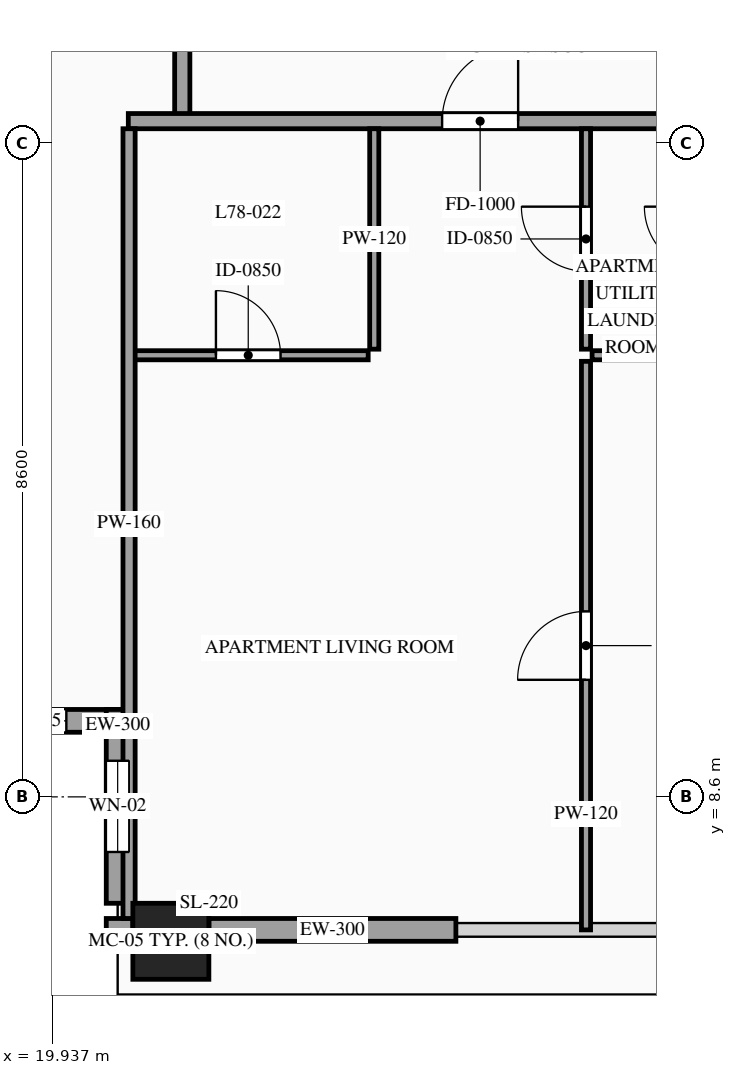
"""IFC4 building model, lengths in metres.
Left out: names, types, materials, properties, quantities, classifications, styles, units other than length and angle.
Written with IfcOpenShell. Run it as: python <this file> out.ifc"""

import sys

from ifc_helpers import new_model, si_unit, direction, frame, frame_2d, origin, origin_2d, place, context, subcontext, project, spatial, rectangle, hollow_rectangle, extrude, source, transform, mapped, element, fill, save


model = new_model("IFC4")
c1 = context("Model", 3, precision=1e-05, world=origin(), true_north=direction((0.0, 1.0)))
c2 = subcontext(c1, "Body", "Model", "MODEL_VIEW")
j1 = project(units=[si_unit("LENGTHUNIT", "METRE"), si_unit("PLANEANGLEUNIT", "RADIAN")], contexts=[c1])
p1 = place(None, origin())
s1 = spatial("IfcSite", under=j1, at=p1, CompositionType="ELEMENT")
p2 = place(p1, origin())
s2 = spatial("IfcBuilding", under=s1, at=p2, CompositionType="ELEMENT")
p3 = place(p2, frame((0.0, 0.0, 292.6)))
s3 = spatial("IfcBuildingStorey", under=s2, at=p3, CompositionType="ELEMENT", Elevation=292.6)
m1 = source(origin(), c2, "Body", "SweptSolid", [
    extrude(hollow_rectangle(XDim=1.0, YDim=1.0, WallThickness=0.048, at=origin_2d()), origin(), (0.0, 0.0, 1.0), 3.5),
])
p4 = place(p3, frame((21.5, 6.7, 0.0), z_axis=(0.0, 0.0, 1.0), x_axis=(1.0, 0.0, 0.0)))
e1 = element("IfcColumn", 1, at=p4, inside=s3, PredefinedType="COLUMN", context=c2, shape_type="MappedRepresentation", body=[
    mapped(m1, transform((0.0, 0.0, 0.0), scale=1.0)),
])
p5 = place(p3, frame((18.4, 9.6, 0.0), z_axis=(0.0, 0.0, 1.0), x_axis=(1.0, 0.0, 0.0)))
e2 = element("IfcWall", 2, at=p5, inside=s3, PredefinedType="SOLIDWALL", context=c2, shape_type="SweptSolid", body=[
    extrude(rectangle(XDim=2.55, YDim=0.3, at=frame_2d((1.275, 0.0))), origin(), (0.0, 0.0, 1.0), 3.28),
])
p6 = place(p5, frame((0.825, 0.0, 0.85)))
e3 = element("IfcOpeningElement", 3, at=p6, cuts=e2, PredefinedType="OPENING", context=c2, shape_type="SweptSolid", body=[
    extrude(rectangle(XDim=0.9, YDim=1.5, at=frame_2d((0.45, 0.75))), frame((0.0, 0.165, 0.0), z_axis=(0.0, -1.0, 0.0), x_axis=(1.0, 0.0, 0.0)), (0.0, 0.0, 1.0), 0.33),
])
p7 = place(p3, frame((20.8, 9.75, 0.0), z_axis=(0.0, 0.0, 1.0), x_axis=(0.0, -1.0, 0.0)))
e4 = element("IfcWall", 4, at=p7, inside=s3, PredefinedType="SOLIDWALL", context=c2, shape_type="SweptSolid", body=[
    extrude(rectangle(XDim=2.55, YDim=0.3, at=frame_2d((1.275, 0.0))), origin(), (0.0, 0.0, 1.0), 3.28),
])
p8 = place(p7, frame((0.675, 0.0, 0.85)))
e5 = element("IfcOpeningElement", 5, at=p8, cuts=e4, PredefinedType="OPENING", context=c2, shape_type="SweptSolid", body=[
    extrude(rectangle(XDim=1.2, YDim=2.1, at=frame_2d((0.6, 1.05))), frame((0.0, 0.165, 0.0), z_axis=(0.0, -1.0, 0.0), x_axis=(1.0, 0.0, 0.0)), (0.0, 0.0, 1.0), 0.33),
])
m2 = source(origin(), c2, "Body", "SweptSolid", [
    extrude(rectangle(XDim=0.35, YDim=0.3, at=frame_2d((0.175, 0.0))), origin(), (0.0, 0.0, 1.0), 3.28),
])
p9 = place(p3, frame((20.65, 6.85, 0.0), z_axis=(0.0, 0.0, 1.0), x_axis=(1.0, 0.0, 0.0)))
e6 = element("IfcWall", 6, at=p9, inside=s3, PredefinedType="SOLIDWALL", context=c2, shape_type="MappedRepresentation", body=[
    mapped(m2, transform((0.0, 0.0, 0.0), scale=1.0)),
])
m3 = source(origin(), c2, "Body", "SweptSolid", [
    extrude(rectangle(XDim=3.25, YDim=0.3, at=frame_2d((1.625, 0.0))), origin(), (0.0, 0.0, 1.0), 2.885),
])
p10 = place(p3, frame((22.0, 6.85, 0.0), z_axis=(0.0, 0.0, 1.0), x_axis=(1.0, 0.0, 0.0)))
e7 = element("IfcWall", 7, at=p10, inside=s3, PredefinedType="SOLIDWALL", context=c2, shape_type="MappedRepresentation", body=[
    mapped(m3, transform((0.0, 0.0, 0.0), scale=1.0)),
])
m4 = source(origin(), c2, "Body", "SweptSolid", [
    extrude(rectangle(XDim=1.7, YDim=0.2, at=frame_2d((0.85, 0.0))), origin(), (0.0, 0.0, 1.0), 3.28),
])
p11 = place(p3, frame((21.65, 17.55, 0.0), z_axis=(0.0, 0.0, 1.0), x_axis=(0.0, 1.0, 0.0)))
e8 = element("IfcWall", 8, at=p11, inside=s3, PredefinedType="PARTITIONING", context=c2, shape_type="MappedRepresentation", body=[
    mapped(m4, transform((0.0, 0.0, 0.0), scale=1.0)),
])
p12 = place(p3, frame((20.94, 17.49, 0.0), z_axis=(0.0, 0.0, 1.0), x_axis=(1.0, 0.0, 0.0)))
e9 = element("IfcWall", 9, at=p12, inside=s3, PredefinedType="PARTITIONING", context=c2, shape_type="SweptSolid", body=[
    extrude(rectangle(XDim=10.52, YDim=0.2, at=frame_2d((5.26, 0.0))), origin(), (0.0, 0.0, 1.0), 3.28),
])
p13 = place(p12, frame((4.129, 0.0, 0.0)))
e10 = element("IfcOpeningElement", 10, at=p13, cuts=e9, PredefinedType="OPENING", context=c2, shape_type="SweptSolid", body=[
    extrude(rectangle(XDim=1.0, YDim=2.2, at=frame_2d((0.5, 1.1))), frame((0.0, 0.115, 0.0), z_axis=(0.0, -1.0, 0.0), x_axis=(1.0, 0.0, 0.0)), (0.0, 0.0, 1.0), 0.23),
])
p14 = place(p3, frame((20.94, 14.41, 0.0), z_axis=(0.0, 0.0, 1.0), x_axis=(1.0, 0.0, 0.0)))
e11 = element("IfcWall", 11, at=p14, inside=s3, PredefinedType="PARTITIONING", context=c2, shape_type="SweptSolid", body=[
    extrude(rectangle(XDim=3.156, YDim=0.12, at=frame_2d((1.578, 0.0))), origin(), (0.0, 0.0, 1.0), 3.28),
])
p15 = place(p14, frame((1.153, 0.0, 0.0)))
e12 = element("IfcOpeningElement", 12, at=p15, cuts=e11, PredefinedType="OPENING", context=c2, shape_type="SweptSolid", body=[
    extrude(rectangle(XDim=0.85, YDim=2.1, at=frame_2d((0.425, 1.05))), frame((0.0, 0.075, 0.0), z_axis=(0.0, -1.0, 0.0), x_axis=(1.0, 0.0, 0.0)), (0.0, 0.0, 1.0), 0.15),
])
m5 = source(origin(), c2, "Body", "SweptSolid", [
    extrude(rectangle(XDim=2.9, YDim=0.12, at=frame_2d((1.45, 0.0))), origin(), (0.0, 0.0, 1.0), 3.28),
])
p16 = place(p3, frame((24.176, 14.49, 0.0), z_axis=(0.0, 0.0, 1.0), x_axis=(0.0, 1.0, 0.0)))
e13 = element("IfcWall", 13, at=p16, inside=s3, PredefinedType="PARTITIONING", context=c2, shape_type="MappedRepresentation", body=[
    mapped(m5, transform((0.0, 0.0, 0.0), scale=1.0)),
])
m6 = source(origin(), c2, "Body", "SweptSolid", [
    extrude(rectangle(XDim=4.418, YDim=0.12, at=frame_2d((2.209, 0.0))), origin(), (0.0, 0.0, 1.0), 3.28),
])
p17 = place(p3, frame((27.042, 14.41, 0.0), z_axis=(0.0, 0.0, 1.0), x_axis=(1.0, 0.0, 0.0)))
e14 = element("IfcWall", 14, at=p17, inside=s3, PredefinedType="PARTITIONING", context=c2, shape_type="MappedRepresentation", body=[
    mapped(m6, transform((0.0, 0.0, 0.0), scale=1.0)),
])
p18 = place(p3, frame((26.962, 6.85, 0.0), z_axis=(0.0, 0.0, 1.0), x_axis=(0.0, 1.0, 0.0)))
e15 = element("IfcWall", 15, at=p18, inside=s3, PredefinedType="PARTITIONING", context=c2, shape_type="SweptSolid", body=[
    extrude(rectangle(XDim=7.48, YDim=0.12, at=frame_2d((3.74, 0.0))), origin(), (0.0, 0.0, 1.0), 3.28),
])
p19 = place(p18, frame((3.29, 0.0, 0.0)))
e16 = element("IfcOpeningElement", 16, at=p19, cuts=e15, PredefinedType="OPENING", context=c2, shape_type="SweptSolid", body=[
    extrude(rectangle(XDim=0.9, YDim=2.15, at=frame_2d((0.45, 1.075))), frame((0.0, 0.075, 0.0), z_axis=(0.0, -1.0, 0.0), x_axis=(1.0, 0.0, 0.0)), (0.0, 0.0, 1.0), 0.15),
])
p20 = place(p3, frame((26.962, 14.49, 0.0), z_axis=(0.0, 0.0, 1.0), x_axis=(0.0, 1.0, 0.0)))
e17 = element("IfcWall", 17, at=p20, inside=s3, PredefinedType="PARTITIONING", context=c2, shape_type="SweptSolid", body=[
    extrude(rectangle(XDim=2.9, YDim=0.12, at=frame_2d((1.45, 0.0))), origin(), (0.0, 0.0, 1.0), 3.28),
])
p21 = place(p20, frame((1.025, 0.0, 0.0)))
e18 = element("IfcOpeningElement", 18, at=p21, cuts=e17, PredefinedType="OPENING", context=c2, shape_type="SweptSolid", body=[
    extrude(rectangle(XDim=0.85, YDim=2.1, at=frame_2d((0.425, 1.05))), frame((0.0, 0.075, 0.0), z_axis=(0.0, -1.0, 0.0), x_axis=(1.0, 0.0, 0.0)), (0.0, 0.0, 1.0), 0.15),
])
m7 = source(origin(), c2, "Body", "SweptSolid", [
    extrude(rectangle(XDim=10.39, YDim=0.16, at=frame_2d((5.195, 0.0))), origin(), (0.0, 0.0, 1.0), 3.28),
])
p22 = place(p3, frame((20.95, 7.0, 0.0), z_axis=(0.0, 0.0, 1.0), x_axis=(0.0, 1.0, 0.0)))
e19 = element("IfcWall", 19, at=p22, inside=s3, PredefinedType="PARTITIONING", context=c2, shape_type="MappedRepresentation", body=[
    mapped(m7, transform((0.0, 0.0, 0.0), scale=1.0)),
])
m8 = source(origin(), c2, "Body", "SweptSolid", [
    extrude(rectangle(XDim=0.9, YDim=1.5, at=frame_2d((0.45, 0.75))), frame((0.0, 0.03, 0.0), z_axis=(0.0, -1.0, 0.0), x_axis=(1.0, 0.0, 0.0)), (0.0, 0.0, 1.0), 0.06),
])
p23 = place(p6, origin())
e20 = element("IfcWindow", 20, at=p23, inside=s3, PartitioningType="SINGLE_PANEL", PredefinedType="WINDOW", context=c2, shape_type="MappedRepresentation", body=[
    mapped(m8, transform((0.0, 0.0, 0.0), scale=1.0)),
])
fill(e3, e20)
m9 = source(origin(), c2, "Body", "SweptSolid", [
    extrude(rectangle(XDim=1.2, YDim=2.1, at=frame_2d((0.6, 1.05))), frame((0.0, 0.03, 0.0), z_axis=(0.0, -1.0, 0.0), x_axis=(1.0, 0.0, 0.0)), (0.0, 0.0, 1.0), 0.06),
])
p24 = place(p8, origin())
e21 = element("IfcWindow", 21, at=p24, inside=s3, PartitioningType="SINGLE_PANEL", PredefinedType="WINDOW", context=c2, shape_type="MappedRepresentation", body=[
    mapped(m9, transform((0.0, 0.0, 0.0), scale=1.0)),
])
fill(e5, e21)
m10 = source(origin(), c2, "Body", "SweptSolid", [
    extrude(rectangle(XDim=1.0, YDim=2.2, at=frame_2d((0.5, 1.1))), frame((0.0, 0.025, 0.0), z_axis=(0.0, -1.0, 0.0), x_axis=(1.0, 0.0, 0.0)), (0.0, 0.0, 1.0), 0.05),
])
p25 = place(p13, origin())
e22 = element("IfcDoor", 22, at=p25, inside=s3, OperationType="SINGLE_SWING_RIGHT", PredefinedType="DOOR", context=c2, shape_type="MappedRepresentation", body=[
    mapped(m10, transform((0.0, 0.0, 0.0), scale=1.0)),
])
fill(e10, e22)
m11 = source(origin(), c2, "Body", "SweptSolid", [
    extrude(rectangle(XDim=0.85, YDim=2.1, at=frame_2d((0.425, 1.05))), frame((0.0, 0.025, 0.0), z_axis=(0.0, -1.0, 0.0), x_axis=(1.0, 0.0, 0.0)), (0.0, 0.0, 1.0), 0.05),
])
p26 = place(p15, origin())
e23 = element("IfcDoor", 23, at=p26, inside=s3, OperationType="SINGLE_SWING_LEFT", PredefinedType="DOOR", context=c2, shape_type="MappedRepresentation", body=[
    mapped(m11, transform((0.0, 0.0, 0.0), scale=1.0)),
])
fill(e12, e23)
m12 = source(origin(), c2, "Body", "SweptSolid", [
    extrude(rectangle(XDim=0.9, YDim=2.15, at=frame_2d((0.45, 1.075))), frame((0.0, 0.025, 0.0), z_axis=(0.0, -1.0, 0.0), x_axis=(1.0, 0.0, 0.0)), (0.0, 0.0, 1.0), 0.05),
])
p27 = place(p19, origin())
e24 = element("IfcDoor", 24, at=p27, inside=s3, OperationType="SINGLE_SWING_LEFT", PredefinedType="DOOR", context=c2, shape_type="MappedRepresentation", body=[
    mapped(m12, transform((0.0, 0.0, 0.0), scale=1.0)),
])
fill(e16, e24)
p28 = place(p21, origin())
e25 = element("IfcDoor", 25, at=p28, inside=s3, OperationType="SINGLE_SWING_RIGHT", PredefinedType="DOOR", context=c2, shape_type="MappedRepresentation", body=[
    mapped(m11, transform((0.0, 0.0, 0.0), scale=1.0)),
])
fill(e18, e25)
save(model, sys.argv[1])
